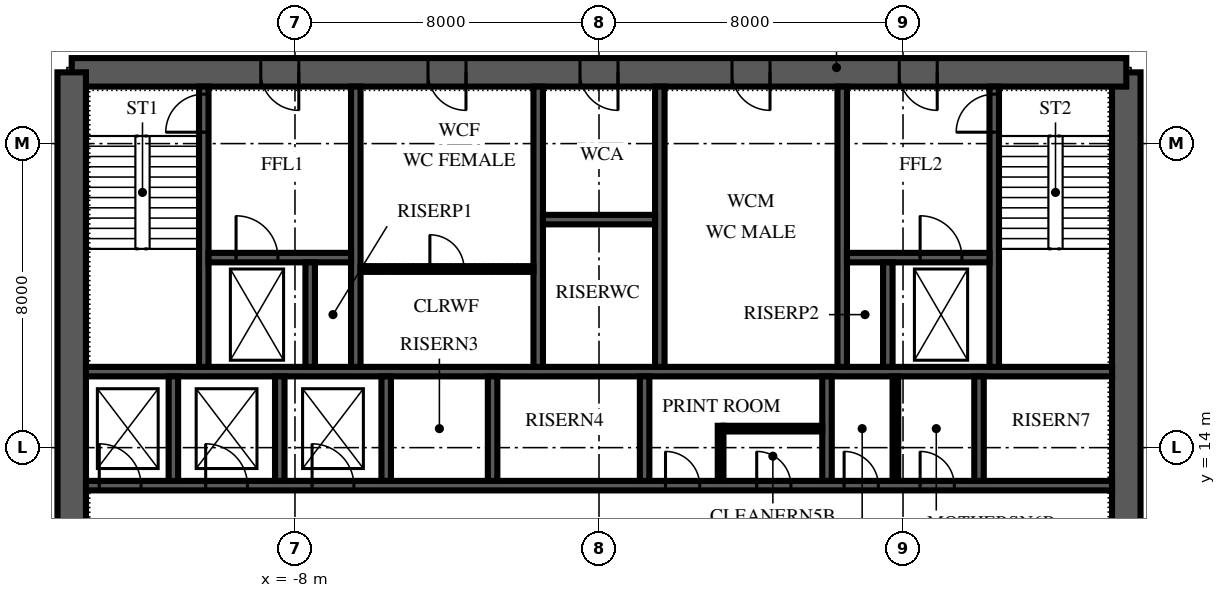
"""IFC4 building model, lengths in metres.
Left out: names, types, materials, properties, quantities, classifications, styles, units other than length and angle.
Written with IfcOpenShell. Run it as: python <this file> out.ifc"""

import sys

from ifc_helpers import new_model, si_unit, direction, frame, frame_2d, origin, place, context, subcontext, project, spatial, polyline, rectangle, outline, extrude, element, fill, save


model = new_model("IFC4")
c1 = context("Model", 3, precision=1e-05, world=origin(), true_north=direction((0.0, 1.0)))
c2 = subcontext(c1, "Body", "Model", "MODEL_VIEW")
j1 = project(units=[si_unit("LENGTHUNIT", "METRE"), si_unit("PLANEANGLEUNIT", "RADIAN")], contexts=[c1])
p1 = place(None, origin())
s1 = spatial("IfcSite", under=j1, at=p1, CompositionType="ELEMENT")
p2 = place(p1, origin())
s2 = spatial("IfcBuilding", under=s1, at=p2, CompositionType="ELEMENT")
p3 = place(p2, frame((0.0, 0.0, 103.0)))
s3 = spatial("IfcBuildingStorey", under=s2, at=p3, CompositionType="ELEMENT", Elevation=103.0)
p4 = place(p3, frame((13.875, 6.125, 0.0), z_axis=(0.0, 0.0, 1.0), x_axis=(0.0, 1.0, 0.0)))
e1 = element("IfcWall", 1, at=p4, inside=s3, PredefinedType="SHEAR", context=c2, shape_type="SweptSolid", body=[
    extrude(outline(polyline([(0.0, -0.375), (17.75, -0.375), (17.75, 0.0), (17.375, 0.0), (17.375, 0.375), (0.375, 0.375), (0.375, 0.0), (0.0, 0.0), (0.0, -0.375)])), origin(), (0.0, 0.0, 1.0), 4.0),
])
p5 = place(p4, frame((4.175, 0.0, 0.0)))
e2 = element("IfcOpeningElement", 2, at=p5, cuts=e1, PredefinedType="OPENING", context=c2, shape_type="SweptSolid", body=[
    extrude(rectangle(XDim=1.8, YDim=2.4, at=frame_2d((0.9, 1.2))), frame((0.0, 0.39, 0.0), z_axis=(0.0, -1.0, 0.0), x_axis=(1.0, 0.0, 0.0)), (0.0, 0.0, 1.0), 0.78),
])
p6 = place(p3, frame((13.875, 23.875, 0.0), z_axis=(0.0, 0.0, 1.0), x_axis=(-1.0, 0.0, 0.0)))
e3 = element("IfcWall", 3, at=p6, inside=s3, PredefinedType="SHEAR", context=c2, shape_type="SweptSolid", body=[
    extrude(rectangle(XDim=27.75, YDim=0.75, at=frame_2d((13.875, 0.0))), origin(), (0.0, 0.0, 1.0), 4.0),
])
p7 = place(p6, frame((21.775, 0.0, 0.0)))
e4 = element("IfcOpeningElement", 4, at=p7, cuts=e3, PredefinedType="OPENING", context=c2, shape_type="SweptSolid", body=[
    extrude(rectangle(XDim=1.0, YDim=2.1, at=frame_2d((0.5, 1.05))), frame((0.0, 0.39, 0.0), z_axis=(0.0, -1.0, 0.0), x_axis=(1.0, 0.0, 0.0)), (0.0, 0.0, 1.0), 0.78),
])
p8 = place(p6, frame((4.975, 0.0, 0.0)))
e5 = element("IfcOpeningElement", 5, at=p8, cuts=e3, PredefinedType="OPENING", context=c2, shape_type="SweptSolid", body=[
    extrude(rectangle(XDim=1.0, YDim=2.1, at=frame_2d((0.5, 1.05))), frame((0.0, 0.39, 0.0), z_axis=(0.0, -1.0, 0.0), x_axis=(1.0, 0.0, 0.0)), (0.0, 0.0, 1.0), 0.78),
])
p9 = place(p6, frame((17.375, 0.0, 0.0)))
e6 = element("IfcOpeningElement", 6, at=p9, cuts=e3, PredefinedType="OPENING", context=c2, shape_type="SweptSolid", body=[
    extrude(rectangle(XDim=1.0, YDim=2.1, at=frame_2d((0.5, 1.05))), frame((0.0, 0.39, 0.0), z_axis=(0.0, -1.0, 0.0), x_axis=(1.0, 0.0, 0.0)), (0.0, 0.0, 1.0), 0.78),
])
p10 = place(p6, frame((13.375, 0.0, 0.0)))
e7 = element("IfcOpeningElement", 7, at=p10, cuts=e3, PredefinedType="OPENING", context=c2, shape_type="SweptSolid", body=[
    extrude(rectangle(XDim=1.0, YDim=2.1, at=frame_2d((0.5, 1.05))), frame((0.0, 0.39, 0.0), z_axis=(0.0, -1.0, 0.0), x_axis=(1.0, 0.0, 0.0)), (0.0, 0.0, 1.0), 0.78),
])
p11 = place(p6, frame((9.375, 0.0, 0.0)))
e8 = element("IfcOpeningElement", 8, at=p11, cuts=e3, PredefinedType="OPENING", context=c2, shape_type="SweptSolid", body=[
    extrude(rectangle(XDim=1.0, YDim=2.1, at=frame_2d((0.5, 1.05))), frame((0.0, 0.39, 0.0), z_axis=(0.0, -1.0, 0.0), x_axis=(1.0, 0.0, 0.0)), (0.0, 0.0, 1.0), 0.78),
])
p12 = place(p3, frame((-13.875, 23.875, 0.0), z_axis=(0.0, 0.0, 1.0), x_axis=(0.0, -1.0, 0.0)))
e9 = element("IfcWall", 9, at=p12, inside=s3, PredefinedType="SHEAR", context=c2, shape_type="SweptSolid", body=[
    extrude(outline(polyline([(0.0, -0.375), (17.75, -0.375), (17.75, 0.0), (17.375, 0.0), (17.375, 0.375), (0.375, 0.375), (0.375, 0.0), (0.0, 0.0), (0.0, -0.375)])), origin(), (0.0, 0.0, 1.0), 4.0),
])
p13 = place(p12, frame((11.775, 0.0, 0.0)))
e10 = element("IfcOpeningElement", 10, at=p13, cuts=e9, PredefinedType="OPENING", context=c2, shape_type="SweptSolid", body=[
    extrude(rectangle(XDim=1.8, YDim=2.4, at=frame_2d((0.9, 1.2))), frame((0.0, 0.39, 0.0), z_axis=(0.0, -1.0, 0.0), x_axis=(1.0, 0.0, 0.0)), (0.0, 0.0, 1.0), 0.78),
])
p14 = place(p3, frame((-13.5, 13.0, 0.0), z_axis=(0.0, 0.0, 1.0), x_axis=(1.0, 0.0, 0.0)))
e11 = element("IfcWall", 11, at=p14, inside=s3, PredefinedType="SHEAR", context=c2, shape_type="SweptSolid", body=[
    extrude(rectangle(XDim=27.0, YDim=0.25, at=frame_2d((13.5, 0.0))), origin(), (0.0, 0.0, 1.0), 4.0),
])
p15 = place(p14, frame((0.35, 0.0, 0.0)))
e12 = element("IfcOpeningElement", 12, at=p15, cuts=e11, PredefinedType="OPENING", context=c2, shape_type="SweptSolid", body=[
    extrude(rectangle(XDim=1.1, YDim=2.1, at=frame_2d((0.55, 1.05))), frame((0.0, 0.14, 0.0), z_axis=(0.0, -1.0, 0.0), x_axis=(1.0, 0.0, 0.0)), (0.0, 0.0, 1.0), 0.28),
])
p16 = place(p14, frame((3.15, 0.0, 0.0)))
e13 = element("IfcOpeningElement", 13, at=p16, cuts=e11, PredefinedType="OPENING", context=c2, shape_type="SweptSolid", body=[
    extrude(rectangle(XDim=1.1, YDim=2.1, at=frame_2d((0.55, 1.05))), frame((0.0, 0.14, 0.0), z_axis=(0.0, -1.0, 0.0), x_axis=(1.0, 0.0, 0.0)), (0.0, 0.0, 1.0), 0.28),
])
p17 = place(p14, frame((5.95, 0.0, 0.0)))
e14 = element("IfcOpeningElement", 14, at=p17, cuts=e11, PredefinedType="OPENING", context=c2, shape_type="SweptSolid", body=[
    extrude(rectangle(XDim=1.1, YDim=2.1, at=frame_2d((0.55, 1.05))), frame((0.0, 0.14, 0.0), z_axis=(0.0, -1.0, 0.0), x_axis=(1.0, 0.0, 0.0)), (0.0, 0.0, 1.0), 0.28),
])
p18 = place(p14, frame((15.25, 0.0, 0.0)))
e15 = element("IfcOpeningElement", 15, at=p18, cuts=e11, PredefinedType="OPENING", context=c2, shape_type="SweptSolid", body=[
    extrude(rectangle(XDim=0.9, YDim=2.1, at=frame_2d((0.45, 1.05))), frame((0.0, 0.14, 0.0), z_axis=(0.0, -1.0, 0.0), x_axis=(1.0, 0.0, 0.0)), (0.0, 0.0, 1.0), 0.28),
])
p19 = place(p14, frame((17.65, 0.0, 0.0)))
e16 = element("IfcOpeningElement", 16, at=p19, cuts=e11, PredefinedType="OPENING", context=c2, shape_type="SweptSolid", body=[
    extrude(rectangle(XDim=0.9, YDim=2.1, at=frame_2d((0.45, 1.05))), frame((0.0, 0.14, 0.0), z_axis=(0.0, -1.0, 0.0), x_axis=(1.0, 0.0, 0.0)), (0.0, 0.0, 1.0), 0.28),
])
p20 = place(p14, frame((19.95, 0.0, 0.0)))
e17 = element("IfcOpeningElement", 17, at=p20, cuts=e11, PredefinedType="OPENING", context=c2, shape_type="SweptSolid", body=[
    extrude(rectangle(XDim=0.9, YDim=2.1, at=frame_2d((0.45, 1.05))), frame((0.0, 0.14, 0.0), z_axis=(0.0, -1.0, 0.0), x_axis=(1.0, 0.0, 0.0)), (0.0, 0.0, 1.0), 0.28),
])
p21 = place(p14, frame((21.95, 0.0, 0.0)))
e18 = element("IfcOpeningElement", 18, at=p21, cuts=e11, PredefinedType="OPENING", context=c2, shape_type="SweptSolid", body=[
    extrude(rectangle(XDim=0.9, YDim=2.1, at=frame_2d((0.45, 1.05))), frame((0.0, 0.14, 0.0), z_axis=(0.0, -1.0, 0.0), x_axis=(1.0, 0.0, 0.0)), (0.0, 0.0, 1.0), 0.28),
])
p22 = place(p3, frame((-13.5, 16.0, 0.0), z_axis=(0.0, 0.0, 1.0), x_axis=(1.0, 0.0, 0.0)))
e19 = element("IfcWall", 19, at=p22, inside=s3, PredefinedType="SHEAR", context=c2, shape_type="SweptSolid", body=[
    extrude(rectangle(XDim=27.0, YDim=0.25, at=frame_2d((13.5, 0.0))), origin(), (0.0, 0.0, 1.0), 4.0),
])
for number, where, z_axis, x_axis in (
    (20, (-11.2, 13.125, 0.0), (0.0, 0.0, 1.0), (0.0, 1.0, 0.0)),
    (21, (-8.4, 13.125, 0.0), (0.0, 0.0, 1.0), (0.0, 1.0, 0.0)),
    (22, (-5.6, 13.125, 0.0), (0.0, 0.0, 1.0), (0.0, 1.0, 0.0)),
    (23, (-2.8, 13.125, 0.0), (0.0, 0.0, 1.0), (0.0, 1.0, 0.0)),
    (24, (1.2, 13.125, 0.0), (0.0, 0.0, 1.0), (0.0, 1.0, 0.0)),
    (25, (6.0, 13.125, 0.0), (0.0, 0.0, 1.0), (0.0, 1.0, 0.0)),
    (26, (10.0, 13.125, 0.0), (0.0, 0.0, 1.0), (0.0, 1.0, 0.0)),
):
    element("IfcWall", number, at=place(p3, frame(where, z_axis=z_axis, x_axis=x_axis)), inside=s3, PredefinedType="SHEAR", context=c2, shape_type="SweptSolid", body=[
        extrude(rectangle(XDim=2.75, YDim=0.25, at=frame_2d((1.375, 0.0))), origin(), (0.0, 0.0, 1.0), 4.0),
    ])
p23 = place(p3, frame((-10.4, 16.125, 0.0), z_axis=(0.0, 0.0, 1.0), x_axis=(0.0, 1.0, 0.0)))
e27 = element("IfcWall", 27, at=p23, inside=s3, PredefinedType="SHEAR", context=c2, shape_type="SweptSolid", body=[
    extrude(rectangle(XDim=7.375, YDim=0.25, at=frame_2d((3.688, 0.0))), origin(), (0.0, 0.0, 1.0), 4.0),
])
p24 = place(p23, frame((6.175, 0.0, 0.0)))
e28 = element("IfcOpeningElement", 28, at=p24, cuts=e27, PredefinedType="OPENING", context=c2, shape_type="SweptSolid", body=[
    extrude(rectangle(XDim=1.0, YDim=2.1, at=frame_2d((0.5, 1.05))), frame((0.0, 0.14, 0.0), z_axis=(0.0, -1.0, 0.0), x_axis=(1.0, 0.0, 0.0)), (0.0, 0.0, 1.0), 0.28),
])
for number, where, z_axis, x_axis in (
    (29, (-6.4, 16.125, 0.0), (0.0, 0.0, 1.0), (0.0, 1.0, 0.0)),
    (30, (-1.6, 16.125, 0.0), (0.0, 0.0, 1.0), (0.0, 1.0, 0.0)),
    (31, (1.6, 16.125, 0.0), (0.0, 0.0, 1.0), (0.0, 1.0, 0.0)),
    (32, (6.4, 16.125, 0.0), (0.0, 0.0, 1.0), (0.0, 1.0, 0.0)),
):
    element("IfcWall", number, at=place(p3, frame(where, z_axis=z_axis, x_axis=x_axis)), inside=s3, PredefinedType="SHEAR", context=c2, shape_type="SweptSolid", body=[
        extrude(rectangle(XDim=7.375, YDim=0.25, at=frame_2d((3.688, 0.0))), origin(), (0.0, 0.0, 1.0), 4.0),
    ])
p25 = place(p3, frame((10.4, 16.125, 0.0), z_axis=(0.0, 0.0, 1.0), x_axis=(0.0, 1.0, 0.0)))
e33 = element("IfcWall", 33, at=p25, inside=s3, PredefinedType="SHEAR", context=c2, shape_type="SweptSolid", body=[
    extrude(rectangle(XDim=7.375, YDim=0.25, at=frame_2d((3.688, 0.0))), origin(), (0.0, 0.0, 1.0), 4.0),
])
p26 = place(p25, frame((6.175, 0.0, 0.0)))
e34 = element("IfcOpeningElement", 34, at=p26, cuts=e33, PredefinedType="OPENING", context=c2, shape_type="SweptSolid", body=[
    extrude(rectangle(XDim=1.0, YDim=2.1, at=frame_2d((0.5, 1.05))), frame((0.0, 0.14, 0.0), z_axis=(0.0, -1.0, 0.0), x_axis=(1.0, 0.0, 0.0)), (0.0, 0.0, 1.0), 0.28),
])
p27 = place(p3, frame((-10.275, 19.0, 0.0), z_axis=(0.0, 0.0, 1.0), x_axis=(1.0, 0.0, 0.0)))
e35 = element("IfcWall", 35, at=p27, inside=s3, PredefinedType="SHEAR", context=c2, shape_type="SweptSolid", body=[
    extrude(rectangle(XDim=3.75, YDim=0.25, at=frame_2d((1.875, 0.0))), origin(), (0.0, 0.0, 1.0), 4.0),
])
p28 = place(p27, frame((0.725, 0.0, 0.0)))
e36 = element("IfcOpeningElement", 36, at=p28, cuts=e35, PredefinedType="OPENING", context=c2, shape_type="SweptSolid", body=[
    extrude(rectangle(XDim=1.1, YDim=2.1, at=frame_2d((0.55, 1.05))), frame((0.0, 0.14, 0.0), z_axis=(0.0, -1.0, 0.0), x_axis=(1.0, 0.0, 0.0)), (0.0, 0.0, 1.0), 0.28),
])
p29 = place(p3, frame((6.525, 19.0, 0.0), z_axis=(0.0, 0.0, 1.0), x_axis=(1.0, 0.0, 0.0)))
e37 = element("IfcWall", 37, at=p29, inside=s3, PredefinedType="SHEAR", context=c2, shape_type="SweptSolid", body=[
    extrude(rectangle(XDim=3.75, YDim=0.25, at=frame_2d((1.875, 0.0))), origin(), (0.0, 0.0, 1.0), 4.0),
])
p30 = place(p29, frame((1.925, 0.0, 0.0)))
e38 = element("IfcOpeningElement", 38, at=p30, cuts=e37, PredefinedType="OPENING", context=c2, shape_type="SweptSolid", body=[
    extrude(rectangle(XDim=1.1, YDim=2.1, at=frame_2d((0.55, 1.05))), frame((0.0, 0.14, 0.0), z_axis=(0.0, -1.0, 0.0), x_axis=(1.0, 0.0, 0.0)), (0.0, 0.0, 1.0), 0.28),
])
for number, where, z_axis, x_axis in (
    (39, (-7.6, 16.125, 0.0), (0.0, 0.0, 1.0), (0.0, 1.0, 0.0)),
    (40, (7.6, 16.125, 0.0), (0.0, 0.0, 1.0), (0.0, 1.0, 0.0)),
):
    element("IfcWall", number, at=place(p3, frame(where, z_axis=z_axis, x_axis=x_axis)), inside=s3, PredefinedType="SHEAR", context=c2, shape_type="SweptSolid", body=[
        extrude(rectangle(XDim=2.75, YDim=0.25, at=frame_2d((1.375, 0.0))), origin(), (0.0, 0.0, 1.0), 4.0),
    ])
p31 = place(p3, frame((-1.475, 20.0, 0.0), z_axis=(0.0, 0.0, 1.0), x_axis=(1.0, 0.0, 0.0)))
e41 = element("IfcWall", 41, at=p31, inside=s3, PredefinedType="SHEAR", context=c2, shape_type="SweptSolid", body=[
    extrude(rectangle(XDim=2.95, YDim=0.25, at=frame_2d((1.475, 0.0))), origin(), (0.0, 0.0, 1.0), 4.0),
])
p32 = place(p3, frame((-6.275, 18.7, 0.0), z_axis=(0.0, 0.0, 1.0), x_axis=(1.0, 0.0, 0.0)))
e42 = element("IfcWall", 42, at=p32, inside=s3, PredefinedType="PARTITIONING", context=c2, shape_type="SweptSolid", body=[
    extrude(rectangle(XDim=4.55, YDim=0.15, at=frame_2d((2.275, 0.0))), origin(), (0.0, 0.0, 1.0), 3.85),
])
p33 = place(p32, frame((1.825, 0.0, 0.0)))
e43 = element("IfcOpeningElement", 43, at=p33, cuts=e42, PredefinedType="OPENING", context=c2, shape_type="SweptSolid", body=[
    extrude(rectangle(XDim=0.9, YDim=2.1, at=frame_2d((0.45, 1.05))), frame((0.0, 0.09, 0.0), z_axis=(0.0, -1.0, 0.0), x_axis=(1.0, 0.0, 0.0)), (0.0, 0.0, 1.0), 0.18),
])
p34 = place(p3, frame((3.2, 13.125, 0.0), z_axis=(0.0, 0.0, 1.0), x_axis=(0.0, 1.0, 0.0)))
e44 = element("IfcWall", 44, at=p34, inside=s3, PredefinedType="PARTITIONING", context=c2, shape_type="SweptSolid", body=[
    extrude(rectangle(XDim=1.45, YDim=0.15, at=frame_2d((0.725, 0.0))), origin(), (0.0, 0.0, 1.0), 3.85),
])
p35 = place(p3, frame((3.275, 14.5, 0.0), z_axis=(0.0, 0.0, 1.0), x_axis=(1.0, 0.0, 0.0)))
e45 = element("IfcWall", 45, at=p35, inside=s3, PredefinedType="PARTITIONING", context=c2, shape_type="SweptSolid", body=[
    extrude(rectangle(XDim=2.6, YDim=0.15, at=frame_2d((1.3, 0.0))), origin(), (0.0, 0.0, 1.0), 3.85),
])
p36 = place(p3, frame((7.8, 13.125, 0.0), z_axis=(0.0, 0.0, 1.0), x_axis=(0.0, 1.0, 0.0)))
e46 = element("IfcWall", 46, at=p36, inside=s3, PredefinedType="PARTITIONING", context=c2, shape_type="SweptSolid", body=[
    extrude(rectangle(XDim=2.75, YDim=0.15, at=frame_2d((1.375, 0.0))), origin(), (0.0, 0.0, 1.0), 3.85),
])
p37 = place(p7, origin())
e47 = element("IfcDoor", 47, at=p37, inside=s3, OperationType="SINGLE_SWING_RIGHT", PredefinedType="DOOR", context=c2, shape_type="SweptSolid", body=[
    extrude(rectangle(XDim=1.0, YDim=2.1, at=frame_2d((0.5, 1.05))), frame((0.0, 0.375, 0.0), z_axis=(0.0, -1.0, 0.0), x_axis=(1.0, 0.0, 0.0)), (0.0, 0.0, 1.0), 0.75),
])
fill(e4, e47)
p38 = place(p8, origin())
e48 = element("IfcDoor", 48, at=p38, inside=s3, OperationType="SINGLE_SWING_RIGHT", PredefinedType="DOOR", context=c2, shape_type="SweptSolid", body=[
    extrude(rectangle(XDim=1.0, YDim=2.1, at=frame_2d((0.5, 1.05))), frame((0.0, 0.375, 0.0), z_axis=(0.0, -1.0, 0.0), x_axis=(1.0, 0.0, 0.0)), (0.0, 0.0, 1.0), 0.75),
])
fill(e5, e48)
p39 = place(p9, origin())
e49 = element("IfcDoor", 49, at=p39, inside=s3, OperationType="SINGLE_SWING_LEFT", PredefinedType="DOOR", context=c2, shape_type="SweptSolid", body=[
    extrude(rectangle(XDim=1.0, YDim=2.1, at=frame_2d((0.5, 1.05))), frame((0.0, 0.375, 0.0), z_axis=(0.0, -1.0, 0.0), x_axis=(1.0, 0.0, 0.0)), (0.0, 0.0, 1.0), 0.75),
])
fill(e6, e49)
p40 = place(p10, origin())
e50 = element("IfcDoor", 50, at=p40, inside=s3, OperationType="SINGLE_SWING_LEFT", PredefinedType="DOOR", context=c2, shape_type="SweptSolid", body=[
    extrude(rectangle(XDim=1.0, YDim=2.1, at=frame_2d((0.5, 1.05))), frame((0.0, 0.375, 0.0), z_axis=(0.0, -1.0, 0.0), x_axis=(1.0, 0.0, 0.0)), (0.0, 0.0, 1.0), 0.75),
])
fill(e7, e50)
p41 = place(p11, origin())
e51 = element("IfcDoor", 51, at=p41, inside=s3, OperationType="SINGLE_SWING_LEFT", PredefinedType="DOOR", context=c2, shape_type="SweptSolid", body=[
    extrude(rectangle(XDim=1.0, YDim=2.1, at=frame_2d((0.5, 1.05))), frame((0.0, 0.375, 0.0), z_axis=(0.0, -1.0, 0.0), x_axis=(1.0, 0.0, 0.0)), (0.0, 0.0, 1.0), 0.75),
])
fill(e8, e51)
p42 = place(p24, origin())
e52 = element("IfcDoor", 52, at=p42, inside=s3, OperationType="SINGLE_SWING_LEFT", PredefinedType="DOOR", context=c2, shape_type="SweptSolid", body=[
    extrude(rectangle(XDim=1.0, YDim=2.1, at=frame_2d((0.5, 1.05))), frame((0.0, 0.125, 0.0), z_axis=(0.0, -1.0, 0.0), x_axis=(1.0, 0.0, 0.0)), (0.0, 0.0, 1.0), 0.25),
])
fill(e28, e52)
p43 = place(p26, origin())
e53 = element("IfcDoor", 53, at=p43, inside=s3, OperationType="SINGLE_SWING_LEFT", PredefinedType="DOOR", context=c2, shape_type="SweptSolid", body=[
    extrude(rectangle(XDim=1.0, YDim=2.1, at=frame_2d((0.5, 1.05))), frame((0.0, 0.125, 0.0), z_axis=(0.0, -1.0, 0.0), x_axis=(1.0, 0.0, 0.0)), (0.0, 0.0, 1.0), 0.25),
])
fill(e34, e53)
p44 = place(p15, origin())
e54 = element("IfcDoor", 54, at=p44, inside=s3, OperationType="SLIDING_TO_LEFT", PredefinedType="DOOR", context=c2, shape_type="SweptSolid", body=[
    extrude(rectangle(XDim=1.1, YDim=2.1, at=frame_2d((0.55, 1.05))), frame((0.0, 0.125, 0.0), z_axis=(0.0, -1.0, 0.0), x_axis=(1.0, 0.0, 0.0)), (0.0, 0.0, 1.0), 0.25),
])
fill(e12, e54)
p45 = place(p16, origin())
e55 = element("IfcDoor", 55, at=p45, inside=s3, OperationType="SLIDING_TO_LEFT", PredefinedType="DOOR", context=c2, shape_type="SweptSolid", body=[
    extrude(rectangle(XDim=1.1, YDim=2.1, at=frame_2d((0.55, 1.05))), frame((0.0, 0.125, 0.0), z_axis=(0.0, -1.0, 0.0), x_axis=(1.0, 0.0, 0.0)), (0.0, 0.0, 1.0), 0.25),
])
fill(e13, e55)
p46 = place(p17, origin())
e56 = element("IfcDoor", 56, at=p46, inside=s3, OperationType="SLIDING_TO_LEFT", PredefinedType="DOOR", context=c2, shape_type="SweptSolid", body=[
    extrude(rectangle(XDim=1.1, YDim=2.1, at=frame_2d((0.55, 1.05))), frame((0.0, 0.125, 0.0), z_axis=(0.0, -1.0, 0.0), x_axis=(1.0, 0.0, 0.0)), (0.0, 0.0, 1.0), 0.25),
])
fill(e14, e56)
p47 = place(p30, origin())
e57 = element("IfcDoor", 57, at=p47, inside=s3, OperationType="SLIDING_TO_RIGHT", PredefinedType="DOOR", context=c2, shape_type="SweptSolid", body=[
    extrude(rectangle(XDim=1.1, YDim=2.1, at=frame_2d((0.55, 1.05))), frame((0.0, 0.125, 0.0), z_axis=(0.0, -1.0, 0.0), x_axis=(1.0, 0.0, 0.0)), (0.0, 0.0, 1.0), 0.25),
])
fill(e38, e57)
p48 = place(p28, origin())
e58 = element("IfcDoor", 58, at=p48, inside=s3, OperationType="SLIDING_TO_RIGHT", PredefinedType="DOOR", context=c2, shape_type="SweptSolid", body=[
    extrude(rectangle(XDim=1.1, YDim=2.1, at=frame_2d((0.55, 1.05))), frame((0.0, 0.125, 0.0), z_axis=(0.0, -1.0, 0.0), x_axis=(1.0, 0.0, 0.0)), (0.0, 0.0, 1.0), 0.25),
])
fill(e36, e58)
p49 = place(p18, origin())
e59 = element("IfcDoor", 59, at=p49, inside=s3, OperationType="SINGLE_SWING_LEFT", PredefinedType="DOOR", context=c2, shape_type="SweptSolid", body=[
    extrude(rectangle(XDim=0.9, YDim=2.1, at=frame_2d((0.45, 1.05))), frame((0.0, 0.125, 0.0), z_axis=(0.0, -1.0, 0.0), x_axis=(1.0, 0.0, 0.0)), (0.0, 0.0, 1.0), 0.25),
])
fill(e15, e59)
p50 = place(p19, origin())
e60 = element("IfcDoor", 60, at=p50, inside=s3, OperationType="SINGLE_SWING_LEFT", PredefinedType="DOOR", context=c2, shape_type="SweptSolid", body=[
    extrude(rectangle(XDim=0.9, YDim=2.1, at=frame_2d((0.45, 1.05))), frame((0.0, 0.125, 0.0), z_axis=(0.0, -1.0, 0.0), x_axis=(1.0, 0.0, 0.0)), (0.0, 0.0, 1.0), 0.25),
])
fill(e16, e60)
p51 = place(p20, origin())
e61 = element("IfcDoor", 61, at=p51, inside=s3, OperationType="SINGLE_SWING_LEFT", PredefinedType="DOOR", context=c2, shape_type="SweptSolid", body=[
    extrude(rectangle(XDim=0.9, YDim=2.1, at=frame_2d((0.45, 1.05))), frame((0.0, 0.125, 0.0), z_axis=(0.0, -1.0, 0.0), x_axis=(1.0, 0.0, 0.0)), (0.0, 0.0, 1.0), 0.25),
])
fill(e17, e61)
p52 = place(p21, origin())
e62 = element("IfcDoor", 62, at=p52, inside=s3, OperationType="SINGLE_SWING_LEFT", PredefinedType="DOOR", context=c2, shape_type="SweptSolid", body=[
    extrude(rectangle(XDim=0.9, YDim=2.1, at=frame_2d((0.45, 1.05))), frame((0.0, 0.125, 0.0), z_axis=(0.0, -1.0, 0.0), x_axis=(1.0, 0.0, 0.0)), (0.0, 0.0, 1.0), 0.25),
])
fill(e18, e62)
p53 = place(p33, origin())
e63 = element("IfcDoor", 63, at=p53, inside=s3, OperationType="SINGLE_SWING_LEFT", PredefinedType="DOOR", context=c2, shape_type="SweptSolid", body=[
    extrude(rectangle(XDim=0.9, YDim=2.1, at=frame_2d((0.45, 1.05))), frame((0.0, 0.075, 0.0), z_axis=(0.0, -1.0, 0.0), x_axis=(1.0, 0.0, 0.0)), (0.0, 0.0, 1.0), 0.149),
])
fill(e43, e63)
save(model, sys.argv[1])
